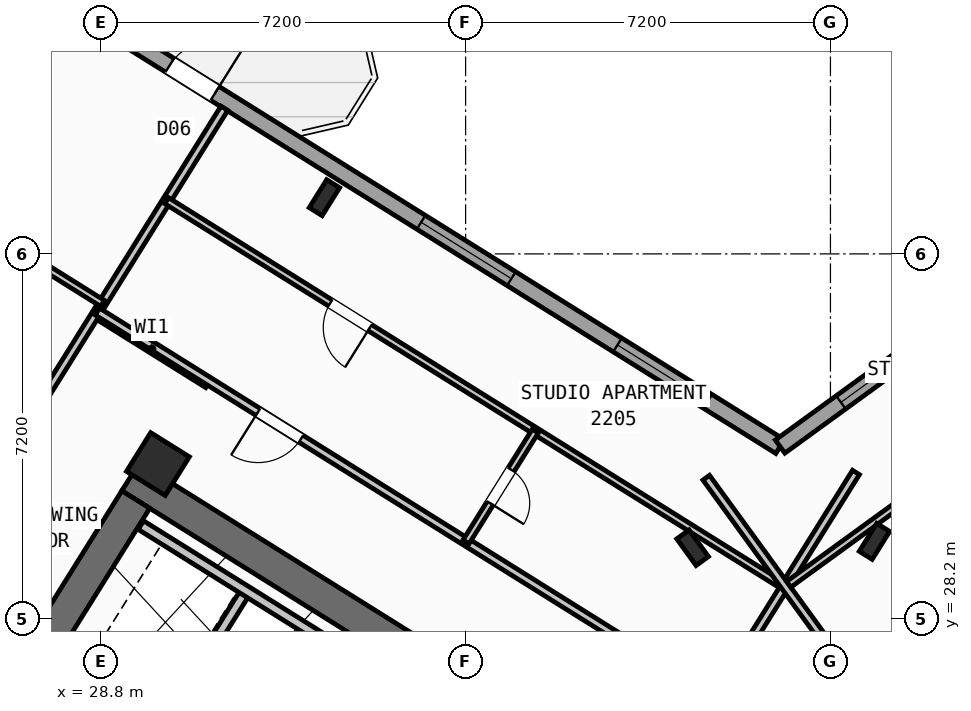
"""IFC4 building model, lengths in metres.
Left out: names, types, materials, properties, quantities, classifications, styles, units other than length and angle.
Written with IfcOpenShell. Run it as: python <this file> out.ifc"""

import sys

from ifc_helpers import new_model, si_unit, direction, frame, frame_2d, origin, origin_2d, place, context, subcontext, project, spatial, rectangle, hollow_rectangle, i_section, extrude, source, transform, mapped, element, fill, save


model = new_model("IFC4")
c1 = context("Model", 3, precision=1e-05, world=origin(), true_north=direction((0.0, 1.0)))
c2 = subcontext(c1, "Body", "Model", "MODEL_VIEW")
j1 = project(units=[si_unit("LENGTHUNIT", "METRE"), si_unit("PLANEANGLEUNIT", "RADIAN")], contexts=[c1])
p1 = place(None, origin())
s1 = spatial("IfcSite", under=j1, at=p1, CompositionType="ELEMENT")
p2 = place(p1, origin())
s2 = spatial("IfcBuilding", under=s1, at=p2, CompositionType="ELEMENT")
p3 = place(p2, frame((0.0, 0.0, 90.0)))
s3 = spatial("IfcBuildingStorey", under=s2, at=p3, CompositionType="ELEMENT", Elevation=90.0)
p4 = place(p3, frame((40.615, 23.983, 0.0), z_axis=(0.0, 0.0, 1.0), x_axis=(-0.848045953968, 0.529922692436, 0.0)))
e1 = element("IfcWall", 1, at=p4, inside=s3, PredefinedType="SHEAR", context=c2, shape_type="SweptSolid", body=[
    extrude(rectangle(XDim=13.24, YDim=0.65, at=frame_2d((6.62, 0.0))), origin(), (0.0, 0.0, 1.0), 3.35),
])
p5 = place(p3, frame((29.491, 30.552, 0.0), z_axis=(0.0, 0.0, 1.0), x_axis=(-0.529893103397, -0.8480644427, 0.0)))
e2 = element("IfcWall", 2, at=p5, inside=s3, PredefinedType="SHEAR", context=c2, shape_type="SweptSolid", body=[
    extrude(rectangle(XDim=3.525, YDim=0.65, at=frame_2d((1.763, 0.0))), origin(), (0.0, 0.0, 1.0), 3.35),
])
p6 = place(p3, frame((44.325, 24.113, 0.0), z_axis=(0.0, 0.0, 1.0), x_axis=(0.809012664862, 0.58779121131, 0.0)))
e3 = element("IfcWall", 3, at=p6, inside=s3, PredefinedType="SHEAR", context=c2, shape_type="SweptSolid", body=[
    extrude(rectangle(XDim=12.44, YDim=0.65, at=frame_2d((6.22, 0.0))), origin(), (0.0, 0.0, 1.0), 3.35),
])
m1 = source(origin(), c2, "Body", "SweptSolid", [
    extrude(i_section(OverallWidth=0.3, OverallDepth=0.65, WebThickness=0.016, FlangeThickness=0.031, at=origin_2d()), origin(), (0.0, 0.0, 1.0), 3.6),
])
for number, where, z_axis, x_axis in (
    (4, (44.068, 29.726, 0.0), (0.0, 0.0, 1.0), (-0.848, 0.53, 0.0)),
    (5, (33.213, 36.509, 0.0), (0.0, 0.0, 1.0), (-0.848, 0.53, 0.0)),
):
    element("IfcColumn", number, at=place(p3, frame(where, z_axis=z_axis, x_axis=x_axis)), inside=s3, PredefinedType="COLUMN", context=c2, shape_type="MappedRepresentation", body=[
        mapped(m1, transform((0.0, 0.0, 0.0), scale=1.0)),
    ])
m2 = source(origin(), c2, "Body", "SweptSolid", [
    extrude(hollow_rectangle(XDim=0.9, YDim=0.9, WallThickness=0.036, at=origin_2d()), origin(), (0.0, 0.0, 1.0), 3.6),
])
p7 = place(p3, frame((29.928, 31.251, 0.0), z_axis=(0.0, 0.0, 1.0), x_axis=(-0.848048096156, 0.529919264233, 0.0)))
e6 = element("IfcColumn", 6, at=p7, inside=s3, PredefinedType="COLUMN", context=c2, shape_type="MappedRepresentation", body=[
    mapped(m2, transform((0.0, 0.0, 0.0), scale=1.0)),
])
p8 = place(p3, frame((40.479, 29.601, 0.0), z_axis=(0.0, 0.0, 1.0), x_axis=(0.809016994375, 0.587785252292, 0.0)))
e7 = element("IfcColumn", 7, at=p8, inside=s3, PredefinedType="COLUMN", context=c2, shape_type="MappedRepresentation", body=[
    mapped(m1, transform((0.0, 0.0, 0.0), scale=1.0)),
])
p9 = place(p3, frame((31.76, 12.183, 0.0), z_axis=(0.0, 0.0, 1.0), x_axis=(-0.848047074256, 0.529920899612, 0.0)))
e8 = element("IfcWall", 8, at=p9, inside=s3, PredefinedType="STANDARD", context=c2, shape_type="SweptSolid", body=[
    extrude(rectangle(XDim=30.652, YDim=0.32, at=frame_2d((15.326, 0.0))), origin(), (0.0, 0.0, 1.0), 3.35),
])
p10 = place(p9, frame((15.153, 0.0, 0.0)))
e9 = element("IfcOpeningElement", 9, at=p10, cuts=e8, PredefinedType="OPENING", context=c2, shape_type="SweptSolid", body=[
    extrude(rectangle(XDim=1.2, YDim=2.15, at=frame_2d((0.6, 1.075))), frame((0.0, 0.17, 0.0), z_axis=(0.0, -1.0, 0.0), x_axis=(1.0, 0.0, 0.0)), (0.0, 0.0, 1.0), 0.34),
])
p11 = place(p9, frame((2.002, 0.0, 0.8)))
e10 = element("IfcOpeningElement", 10, at=p11, cuts=e8, PredefinedType="OPENING", context=c2, shape_type="SweptSolid", body=[
    extrude(rectangle(XDim=2.1, YDim=1.55, at=frame_2d((1.05, 0.775))), frame((0.0, 0.17, 0.0), z_axis=(0.0, -1.0, 0.0), x_axis=(1.0, 0.0, 0.0)), (0.0, 0.0, 1.0), 0.34),
])
p12 = place(p9, frame((7.206, 0.0, 0.8)))
e11 = element("IfcOpeningElement", 11, at=p12, cuts=e8, PredefinedType="OPENING", context=c2, shape_type="SweptSolid", body=[
    extrude(rectangle(XDim=2.1, YDim=1.55, at=frame_2d((1.05, 0.775))), frame((0.0, 0.17, 0.0), z_axis=(0.0, -1.0, 0.0), x_axis=(1.0, 0.0, 0.0)), (0.0, 0.0, 1.0), 0.34),
])
p13 = place(p9, frame((12.648, 0.0, 1.0)))
e12 = element("IfcOpeningElement", 12, at=p13, cuts=e8, PredefinedType="OPENING", context=c2, shape_type="SweptSolid", body=[
    extrude(rectangle(XDim=0.9, YDim=1.25, at=frame_2d((0.45, 0.625))), frame((0.0, 0.17, 0.0), z_axis=(0.0, -1.0, 0.0), x_axis=(1.0, 0.0, 0.0)), (0.0, 0.0, 1.0), 0.34),
])
p14 = place(p9, frame((27.974, 0.0, 0.95)))
e13 = element("IfcOpeningElement", 13, at=p14, cuts=e8, PredefinedType="OPENING", context=c2, shape_type="SweptSolid", body=[
    extrude(rectangle(XDim=1.2, YDim=1.4, at=frame_2d((0.6, 0.7))), frame((0.0, 0.17, 0.0), z_axis=(0.0, -1.0, 0.0), x_axis=(1.0, 0.0, 0.0)), (0.0, 0.0, 1.0), 0.34),
])
p15 = place(p9, frame((18.347, 0.0, 1.0)))
e14 = element("IfcOpeningElement", 14, at=p15, cuts=e8, PredefinedType="OPENING", context=c2, shape_type="SweptSolid", body=[
    extrude(rectangle(XDim=0.9, YDim=1.25, at=frame_2d((0.45, 0.625))), frame((0.0, 0.17, 0.0), z_axis=(0.0, -1.0, 0.0), x_axis=(1.0, 0.0, 0.0)), (0.0, 0.0, 1.0), 0.34),
])
p16 = place(p9, frame((20.931, 0.0, 1.0)))
e15 = element("IfcOpeningElement", 15, at=p16, cuts=e8, PredefinedType="OPENING", context=c2, shape_type="SweptSolid", body=[
    extrude(rectangle(XDim=0.65, YDim=1.15, at=frame_2d((0.325, 0.575))), frame((0.0, 0.17, 0.0), z_axis=(0.0, -1.0, 0.0), x_axis=(1.0, 0.0, 0.0)), (0.0, 0.0, 1.0), 0.34),
])
p17 = place(p9, frame((22.938, 0.0, 1.0)))
e16 = element("IfcOpeningElement", 16, at=p17, cuts=e8, PredefinedType="OPENING", context=c2, shape_type="SweptSolid", body=[
    extrude(rectangle(XDim=0.9, YDim=1.25, at=frame_2d((0.45, 0.625))), frame((0.0, 0.17, 0.0), z_axis=(0.0, -1.0, 0.0), x_axis=(1.0, 0.0, 0.0)), (0.0, 0.0, 1.0), 0.34),
])
p18 = place(p9, frame((25.069, 0.0, 1.0)))
e17 = element("IfcOpeningElement", 17, at=p18, cuts=e8, PredefinedType="OPENING", context=c2, shape_type="SweptSolid", body=[
    extrude(rectangle(XDim=0.9, YDim=1.25, at=frame_2d((0.45, 0.625))), frame((0.0, 0.17, 0.0), z_axis=(0.0, -1.0, 0.0), x_axis=(1.0, 0.0, 0.0)), (0.0, 0.0, 1.0), 0.34),
])
p19 = place(p3, frame((17.424, 47.083, 0.0), z_axis=(0.0, 0.0, 1.0), x_axis=(0.848049927979, -0.529916332693, 0.0)))
e18 = element("IfcWall", 18, at=p19, inside=s3, PredefinedType="STANDARD", context=c2, shape_type="SweptSolid", body=[
    extrude(rectangle(XDim=29.223, YDim=0.32, at=frame_2d((14.612, 0.0))), origin(), (0.0, 0.0, 1.0), 3.35),
])
p20 = place(p19, frame((15.02, 0.0, 0.0)))
e19 = element("IfcOpeningElement", 19, at=p20, cuts=e18, PredefinedType="OPENING", context=c2, shape_type="SweptSolid", body=[
    extrude(rectangle(XDim=1.05, YDim=2.15, at=frame_2d((0.525, 1.075))), frame((0.0, 0.17, 0.0), z_axis=(0.0, -1.0, 0.0), x_axis=(1.0, 0.0, 0.0)), (0.0, 0.0, 1.0), 0.34),
])
p21 = place(p19, frame((20.869, 0.0, 0.8)))
e20 = element("IfcOpeningElement", 20, at=p21, cuts=e18, PredefinedType="OPENING", context=c2, shape_type="SweptSolid", body=[
    extrude(rectangle(XDim=2.1, YDim=1.55, at=frame_2d((1.05, 0.775))), frame((0.0, 0.17, 0.0), z_axis=(0.0, -1.0, 0.0), x_axis=(1.0, 0.0, 0.0)), (0.0, 0.0, 1.0), 0.34),
])
p22 = place(p19, frame((25.438, 0.0, 0.8)))
e21 = element("IfcOpeningElement", 21, at=p22, cuts=e18, PredefinedType="OPENING", context=c2, shape_type="SweptSolid", body=[
    extrude(rectangle(XDim=2.1, YDim=1.55, at=frame_2d((1.05, 0.775))), frame((0.0, 0.17, 0.0), z_axis=(0.0, -1.0, 0.0), x_axis=(1.0, 0.0, 0.0)), (0.0, 0.0, 1.0), 0.34),
])
p23 = place(p19, frame((10.481, 0.0, 1.0)))
e22 = element("IfcOpeningElement", 22, at=p23, cuts=e18, PredefinedType="OPENING", context=c2, shape_type="SweptSolid", body=[
    extrude(rectangle(XDim=0.9, YDim=1.25, at=frame_2d((0.45, 0.625))), frame((0.0, 0.17, 0.0), z_axis=(0.0, -1.0, 0.0), x_axis=(1.0, 0.0, 0.0)), (0.0, 0.0, 1.0), 0.34),
])
p24 = place(p19, frame((6.674, 0.0, 1.0)))
e23 = element("IfcOpeningElement", 23, at=p24, cuts=e18, PredefinedType="OPENING", context=c2, shape_type="SweptSolid", body=[
    extrude(rectangle(XDim=0.9, YDim=1.25, at=frame_2d((0.45, 0.625))), frame((0.0, 0.17, 0.0), z_axis=(0.0, -1.0, 0.0), x_axis=(1.0, 0.0, 0.0)), (0.0, 0.0, 1.0), 0.34),
])
p25 = place(p19, frame((3.694, 0.0, 1.0)))
e24 = element("IfcOpeningElement", 24, at=p25, cuts=e18, PredefinedType="OPENING", context=c2, shape_type="SweptSolid", body=[
    extrude(rectangle(XDim=0.9, YDim=1.25, at=frame_2d((0.45, 0.625))), frame((0.0, 0.17, 0.0), z_axis=(0.0, -1.0, 0.0), x_axis=(1.0, 0.0, 0.0)), (0.0, 0.0, 1.0), 0.34),
])
p26 = place(p3, frame((42.207, 31.597, 0.0), z_axis=(0.0, 0.0, 1.0), x_axis=(0.809020333377, 0.587780656523, 0.0)))
e25 = element("IfcWall", 25, at=p26, inside=s3, PredefinedType="STANDARD", context=c2, shape_type="SweptSolid", body=[
    extrude(rectangle(XDim=15.223, YDim=0.32, at=frame_2d((7.611, 0.0))), origin(), (0.0, 0.0, 1.0), 3.35),
])
p27 = place(p26, frame((12.831, 0.0, 0.0)))
e26 = element("IfcOpeningElement", 26, at=p27, cuts=e25, PredefinedType="OPENING", context=c2, shape_type="SweptSolid", body=[
    extrude(rectangle(XDim=1.05, YDim=2.15, at=frame_2d((0.525, 1.075))), frame((0.0, 0.17, 0.0), z_axis=(0.0, -1.0, 0.0), x_axis=(1.0, 0.0, 0.0)), (0.0, 0.0, 1.0), 0.34),
])
p28 = place(p26, frame((1.484, 0.0, 0.8)))
e27 = element("IfcOpeningElement", 27, at=p28, cuts=e25, PredefinedType="OPENING", context=c2, shape_type="SweptSolid", body=[
    extrude(rectangle(XDim=2.1, YDim=1.55, at=frame_2d((1.05, 0.775))), frame((0.0, 0.17, 0.0), z_axis=(0.0, -1.0, 0.0), x_axis=(1.0, 0.0, 0.0)), (0.0, 0.0, 1.0), 0.34),
])
p29 = place(p26, frame((5.652, 0.0, 0.8)))
e28 = element("IfcOpeningElement", 28, at=p29, cuts=e25, PredefinedType="OPENING", context=c2, shape_type="SweptSolid", body=[
    extrude(rectangle(XDim=2.1, YDim=1.55, at=frame_2d((1.05, 0.775))), frame((0.0, 0.17, 0.0), z_axis=(0.0, -1.0, 0.0), x_axis=(1.0, 0.0, 0.0)), (0.0, 0.0, 1.0), 0.34),
])
p30 = place(p3, frame((31.645, 28.716, 0.0), z_axis=(0.0, 0.0, 1.0), x_axis=(-0.52986693015, -0.848080795876, 0.0)))
e29 = element("IfcWall", 29, at=p30, inside=s3, PredefinedType="STANDARD", context=c2, shape_type="SweptSolid", body=[
    extrude(rectangle(XDim=2.66, YDim=0.2, at=frame_2d((1.33, 0.0))), origin(), (0.0, 0.0, 1.0), 3.34),
])
p31 = place(p3, frame((33.363, 27.69, 0.0), z_axis=(0.0, 0.0, 1.0), x_axis=(-0.848053806312, 0.529910125964, 0.0)))
e30 = element("IfcWall", 30, at=p31, inside=s3, PredefinedType="STANDARD", context=c2, shape_type="SweptSolid", body=[
    extrude(rectangle(XDim=4.448, YDim=0.2, at=frame_2d((2.224, 0.0))), origin(), (0.0, 0.0, 1.0), 3.34),
])
p32 = place(p3, frame((30.914, 32.829, 0.0), z_axis=(0.0, 0.0, 1.0), x_axis=(-0.848008813643, 0.529982124211, 0.0)))
e31 = element("IfcWall", 31, at=p32, inside=s3, PredefinedType="PARTITIONING", context=c2, shape_type="SweptSolid", body=[
    extrude(rectangle(XDim=2.61, YDim=0.16, at=frame_2d((1.305, 0.0))), origin(), (0.0, 0.0, 1.0), 3.34),
])
p33 = place(p3, frame((31.239, 38.274, 0.0), z_axis=(0.0, 0.0, 1.0), x_axis=(-0.529928058306, -0.848042600947, 0.0)))
e32 = element("IfcWall", 32, at=p33, inside=s3, PredefinedType="PARTITIONING", context=c2, shape_type="SweptSolid", body=[
    extrude(rectangle(XDim=8.05, YDim=0.16, at=frame_2d((4.025, 0.0))), origin(), (0.0, 0.0, 1.0), 3.34),
])
p34 = place(p3, frame((28.833, 34.424, 0.0), z_axis=(0.0, 0.0, 1.0), x_axis=(-0.848059820872, 0.529900500304, 0.0)))
e33 = element("IfcWall", 33, at=p34, inside=s3, PredefinedType="PLUMBINGWALL", context=c2, shape_type="SweptSolid", body=[
    extrude(rectangle(XDim=3.79, YDim=0.14, at=frame_2d((1.895, 0.0))), origin(), (0.0, 0.0, 1.0), 3.34),
])
p35 = place(p34, frame((1.99, 0.0, 0.0)))
e34 = element("IfcOpeningElement", 34, at=p35, cuts=e33, PredefinedType="OPENING", context=c2, shape_type="SweptSolid", body=[
    extrude(rectangle(XDim=0.92, YDim=2.08, at=frame_2d((0.46, 1.04))), frame((0.0, 0.08, 0.0), z_axis=(0.0, -1.0, 0.0), x_axis=(1.0, 0.0, 0.0)), (0.0, 0.0, 1.0), 0.16),
])
p36 = place(p3, frame((41.936, 26.012, 0.0), z_axis=(0.0, 0.0, 1.0), x_axis=(-0.848051154596, 0.529914369676, 0.0)))
e35 = element("IfcWall", 35, at=p36, inside=s3, PredefinedType="PARTITIONING", context=c2, shape_type="SweptSolid", body=[
    extrude(rectangle(XDim=15.57, YDim=0.16, at=frame_2d((7.785, 0.0))), origin(), (0.0, 0.0, 1.0), 3.34),
])
p37 = place(p36, frame((10.83, 0.0, 0.0)))
e36 = element("IfcOpeningElement", 36, at=p37, cuts=e35, PredefinedType="OPENING", context=c2, shape_type="SweptSolid", body=[
    extrude(rectangle(XDim=1.0, YDim=2.1, at=frame_2d((0.5, 1.05))), frame((0.0, 0.09, 0.0), z_axis=(0.0, -1.0, 0.0), x_axis=(1.0, 0.0, 0.0)), (0.0, 0.0, 1.0), 0.18),
])
p38 = place(p3, frame((43.704, 31.086, 0.0), z_axis=(0.0, 0.0, 1.0), x_axis=(-0.529906828443, -0.848055866774, 0.0)))
e37 = element("IfcWall", 37, at=p38, inside=s3, PredefinedType="PARTITIONING", context=c2, shape_type="SweptSolid", body=[
    extrude(rectangle(XDim=5.48, YDim=0.16, at=frame_2d((2.74, 0.0))), origin(), (0.0, 0.0, 1.0), 3.34),
])
p39 = place(p3, frame((42.226, 28.873, 0.0), z_axis=(0.0, 0.0, 1.0), x_axis=(-0.848049134363, 0.529917602752, 0.0)))
e38 = element("IfcWall", 38, at=p39, inside=s3, PredefinedType="PLUMBINGWALL", context=c2, shape_type="SweptSolid", body=[
    extrude(rectangle(XDim=14.3, YDim=0.14, at=frame_2d((7.15, 0.0))), origin(), (0.0, 0.0, 1.0), 3.34),
])
p40 = place(p39, frame((9.57, 0.0, 0.0)))
e39 = element("IfcOpeningElement", 39, at=p40, cuts=e38, PredefinedType="OPENING", context=c2, shape_type="SweptSolid", body=[
    extrude(rectangle(XDim=0.92, YDim=2.08, at=frame_2d((0.46, 1.04))), frame((0.0, 0.08, 0.0), z_axis=(0.0, -1.0, 0.0), x_axis=(1.0, 0.0, 0.0)), (0.0, 0.0, 1.0), 0.16),
])
p41 = place(p3, frame((37.375, 31.904, 0.0), z_axis=(0.0, 0.0, 1.0), x_axis=(-0.529913878929, -0.848051461244, 0.0)))
e40 = element("IfcWall", 40, at=p41, inside=s3, PredefinedType="PLUMBINGWALL", context=c2, shape_type="SweptSolid", body=[
    extrude(rectangle(XDim=2.58, YDim=0.14, at=frame_2d((1.29, 0.0))), origin(), (0.0, 0.0, 1.0), 3.34),
])
p42 = place(p41, frame((0.9, 0.0, 0.0)))
e41 = element("IfcOpeningElement", 41, at=p42, cuts=e40, PredefinedType="OPENING", context=c2, shape_type="SweptSolid", body=[
    extrude(rectangle(XDim=0.78, YDim=2.05, at=frame_2d((0.39, 1.025))), frame((0.0, 0.08, 0.0), z_axis=(0.0, -1.0, 0.0), x_axis=(1.0, 0.0, 0.0)), (0.0, 0.0, 1.0), 0.16),
])
p43 = place(p3, frame((42.866, 26.044, 0.0), z_axis=(0.0, 0.0, 1.0), x_axis=(0.809020254154, 0.587780765566, 0.0)))
e42 = element("IfcWall", 42, at=p43, inside=s3, PredefinedType="PARTITIONING", context=c2, shape_type="SweptSolid", body=[
    extrude(rectangle(XDim=14.67, YDim=0.16, at=frame_2d((7.335, 0.0))), origin(), (0.0, 0.0, 1.0), 3.34),
])
p44 = place(p43, frame((10.2, 0.0, 0.0)))
e43 = element("IfcOpeningElement", 43, at=p44, cuts=e42, PredefinedType="OPENING", context=c2, shape_type="SweptSolid", body=[
    extrude(rectangle(XDim=1.0, YDim=2.1, at=frame_2d((0.5, 1.05))), frame((0.0, 0.09, 0.0), z_axis=(0.0, -1.0, 0.0), x_axis=(1.0, 0.0, 0.0)), (0.0, 0.0, 1.0), 0.18),
])
p45 = place(p3, frame((43.969, 26.55, 0.0), z_axis=(0.0, 0.0, 1.0), x_axis=(-0.587776919386, 0.80902304852, 0.0)))
e44 = element("IfcWall", 44, at=p45, inside=s3, PredefinedType="PARTITIONING", context=c2, shape_type="SweptSolid", body=[
    extrude(rectangle(XDim=5.48, YDim=0.16, at=frame_2d((2.74, 0.0))), origin(), (0.0, 0.0, 1.0), 3.34),
])
p46 = place(p3, frame((42.377, 28.878, 0.0), z_axis=(0.0, 0.0, 1.0), x_axis=(0.809020411523, 0.587780548963, 0.0)))
e45 = element("IfcWall", 45, at=p46, inside=s3, PredefinedType="PLUMBINGWALL", context=c2, shape_type="SweptSolid", body=[
    extrude(rectangle(XDim=13.4, YDim=0.14, at=frame_2d((6.7, 0.0))), origin(), (0.0, 0.0, 1.0), 3.34),
])
p47 = place(p46, frame((8.94, 0.0, 0.0)))
e46 = element("IfcOpeningElement", 46, at=p47, cuts=e45, PredefinedType="OPENING", context=c2, shape_type="SweptSolid", body=[
    extrude(rectangle(XDim=0.92, YDim=2.08, at=frame_2d((0.46, 1.04))), frame((0.0, 0.08, 0.0), z_axis=(0.0, -1.0, 0.0), x_axis=(1.0, 0.0, 0.0)), (0.0, 0.0, 1.0), 0.16),
])
m3 = source(origin(), c2, "Body", "SweptSolid", [
    extrude(rectangle(XDim=1.05, YDim=2.15, at=frame_2d((0.525, 1.075))), frame((0.0, 0.025, 0.0), z_axis=(0.0, -1.0, 0.0), x_axis=(1.0, 0.0, 0.0)), (0.0, 0.0, 1.0), 0.05),
])
p48 = place(p20, origin())
e47 = element("IfcDoor", 47, at=p48, inside=s3, OperationType="SINGLE_SWING_RIGHT", PredefinedType="DOOR", context=c2, shape_type="MappedRepresentation", body=[
    mapped(m3, transform((0.0, 0.0, 0.0), scale=1.0)),
])
fill(e19, e47)
m4 = source(origin(), c2, "Body", "SweptSolid", [
    extrude(rectangle(XDim=2.1, YDim=1.55, at=frame_2d((1.05, 0.775))), frame((0.0, 0.03, 0.0), z_axis=(0.0, -1.0, 0.0), x_axis=(1.0, 0.0, 0.0)), (0.0, 0.0, 1.0), 0.06),
])
p49 = place(p21, origin())
e48 = element("IfcWindow", 48, at=p49, inside=s3, PartitioningType="SINGLE_PANEL", PredefinedType="WINDOW", context=c2, shape_type="MappedRepresentation", body=[
    mapped(m4, transform((0.0, 0.0, 0.0), scale=1.0)),
])
fill(e20, e48)
p50 = place(p22, origin())
e49 = element("IfcWindow", 49, at=p50, inside=s3, PartitioningType="SINGLE_PANEL", PredefinedType="WINDOW", context=c2, shape_type="MappedRepresentation", body=[
    mapped(m4, transform((0.0, 0.0, 0.0), scale=1.0)),
])
fill(e21, e49)
p51 = place(p28, origin())
e50 = element("IfcWindow", 50, at=p51, inside=s3, PartitioningType="SINGLE_PANEL", PredefinedType="WINDOW", context=c2, shape_type="MappedRepresentation", body=[
    mapped(m4, transform((0.0, 0.0, 0.0), scale=1.0)),
])
fill(e27, e50)
m5 = source(origin(), c2, "Body", "SweptSolid", [
    extrude(rectangle(XDim=1.0, YDim=2.1, at=frame_2d((0.5, 1.05))), frame((0.0, 0.025, 0.0), z_axis=(0.0, -1.0, 0.0), x_axis=(1.0, 0.0, 0.0)), (0.0, 0.0, 1.0), 0.05),
])
p52 = place(p37, origin())
e51 = element("IfcDoor", 51, at=p52, inside=s3, OperationType="SINGLE_SWING_RIGHT", PredefinedType="DOOR", context=c2, shape_type="MappedRepresentation", body=[
    mapped(m5, transform((0.0, 0.0, 0.0), scale=1.0)),
])
fill(e36, e51)
m6 = source(origin(), c2, "Body", "SweptSolid", [
    extrude(rectangle(XDim=0.92, YDim=2.08, at=frame_2d((0.46, 1.04))), frame((0.0, 0.025, 0.0), z_axis=(0.0, -1.0, 0.0), x_axis=(1.0, 0.0, 0.0)), (0.0, 0.0, 1.0), 0.05),
])
p53 = place(p40, origin())
e52 = element("IfcDoor", 52, at=p53, inside=s3, OperationType="SINGLE_SWING_LEFT", PredefinedType="DOOR", context=c2, shape_type="MappedRepresentation", body=[
    mapped(m6, transform((0.0, 0.0, 0.0), scale=1.0)),
])
fill(e39, e52)
m7 = source(origin(), c2, "Body", "SweptSolid", [
    extrude(rectangle(XDim=0.78, YDim=2.05, at=frame_2d((0.39, 1.025))), frame((0.0, 0.025, 0.0), z_axis=(0.0, -1.0, 0.0), x_axis=(1.0, 0.0, 0.0)), (0.0, 0.0, 1.0), 0.05),
])
p54 = place(p42, origin())
e53 = element("IfcDoor", 53, at=p54, inside=s3, OperationType="SINGLE_SWING_RIGHT", PredefinedType="DOOR", context=c2, shape_type="MappedRepresentation", body=[
    mapped(m7, transform((0.0, 0.0, 0.0), scale=1.0)),
])
fill(e41, e53)
save(model, sys.argv[1])
